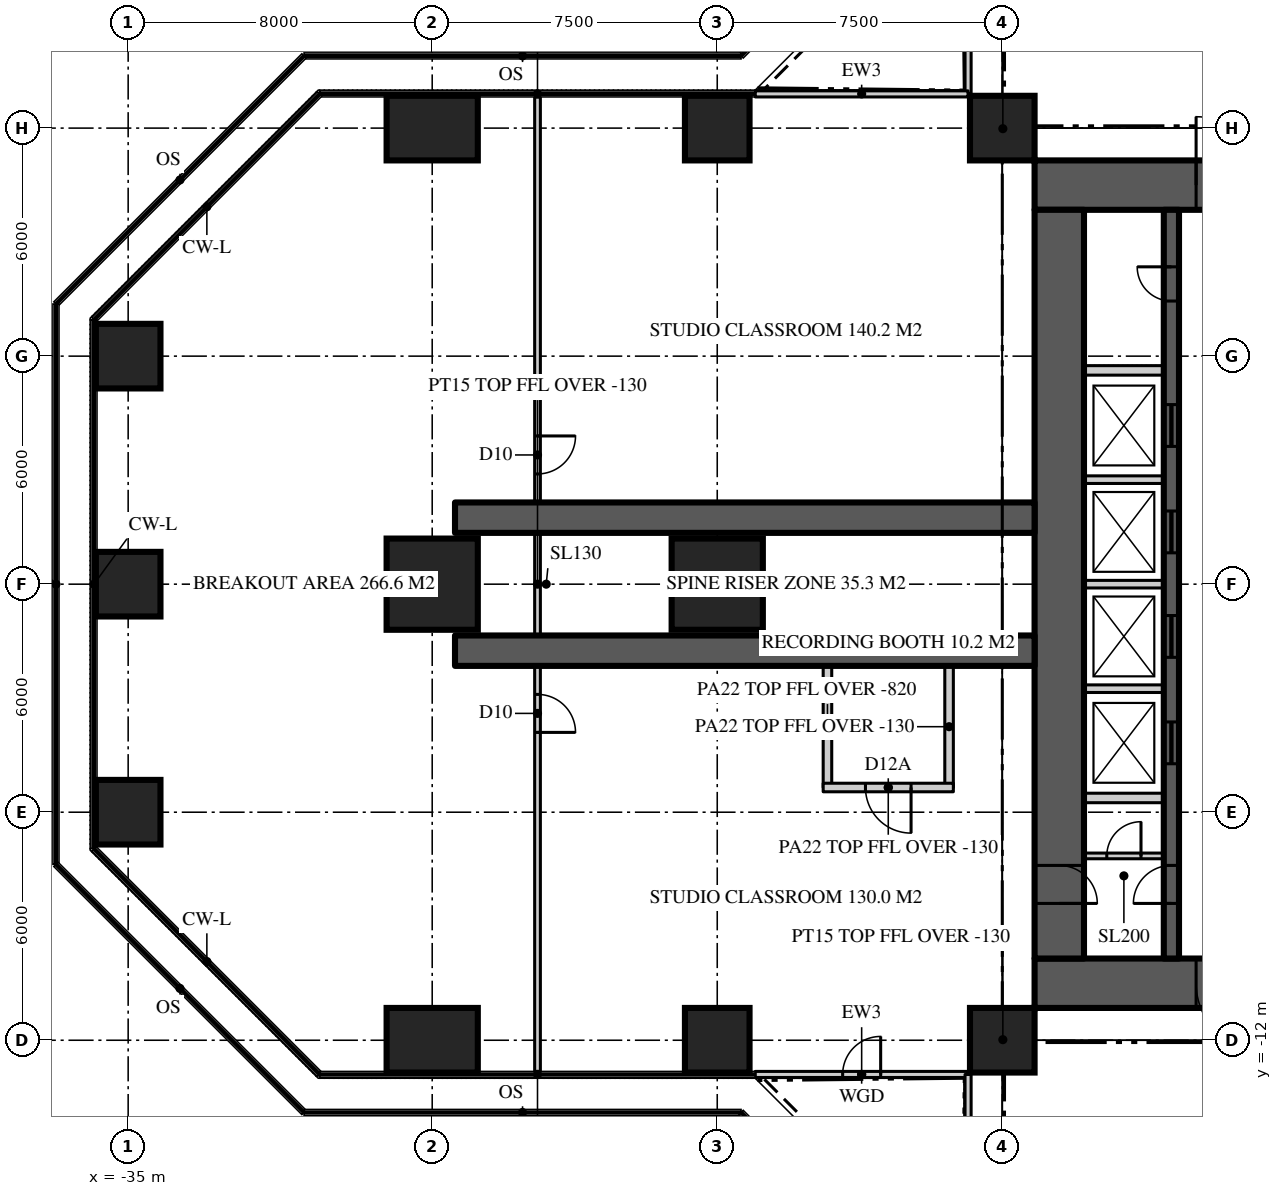
"""IFC4 building model, lengths in metres.
Left out: names, types, materials, properties, quantities, classifications, styles, units other than length and angle.
Written with IfcOpenShell. Run it as: python <this file> out.ifc"""

import sys

from ifc_helpers import new_model, si_unit, direction, frame, frame_2d, origin, origin_2d, place, context, subcontext, project, spatial, rectangle, extrude, element, fill, save


model = new_model("IFC4")
c1 = context("Model", 3, precision=1e-05, world=origin(), true_north=direction((0.0, 1.0)))
c2 = subcontext(c1, "Body", "Model", "MODEL_VIEW")
j1 = project(units=[si_unit("LENGTHUNIT", "METRE"), si_unit("PLANEANGLEUNIT", "RADIAN")], contexts=[c1])
p1 = place(None, origin())
s1 = spatial("IfcSite", under=j1, at=p1, CompositionType="ELEMENT")
p2 = place(p1, origin())
s2 = spatial("IfcBuilding", under=s1, at=p2, CompositionType="ELEMENT")
p3 = place(p2, frame((0.0, 0.0, 109.8)))
s3 = spatial("IfcBuildingStorey", under=s2, at=p3, CompositionType="ELEMENT", Elevation=109.8)
p4 = place(p3, frame((-11.15, 10.5, 0.0), z_axis=(0.0, 0.0, 1.0), x_axis=(1.0, 0.0, 0.0)))
e1 = element("IfcWall", 1, at=p4, inside=s3, PredefinedType="SHEAR", context=c2, shape_type="SweptSolid", body=[
    extrude(rectangle(XDim=22.3, YDim=1.3, at=frame_2d((11.15, 0.0))), origin(), (0.0, 0.0, 1.0), 3.9),
])
p5 = place(p4, frame((4.25, 0.0, 0.0)))
e2 = element("IfcOpeningElement", 2, at=p5, cuts=e1, PredefinedType="OPENING", context=c2, shape_type="SweptSolid", body=[
    extrude(rectangle(XDim=1.8, YDim=2.2, at=frame_2d((0.9, 1.1))), frame((0.0, 0.66, 0.0), z_axis=(0.0, -1.0, 0.0), x_axis=(1.0, 0.0, 0.0)), (0.0, 0.0, 1.0), 1.32),
])
p6 = place(p4, frame((16.25, 0.0, 0.0)))
e3 = element("IfcOpeningElement", 3, at=p6, cuts=e1, PredefinedType="OPENING", context=c2, shape_type="SweptSolid", body=[
    extrude(rectangle(XDim=1.8, YDim=2.2, at=frame_2d((0.9, 1.1))), frame((0.0, 0.66, 0.0), z_axis=(0.0, -1.0, 0.0), x_axis=(1.0, 0.0, 0.0)), (0.0, 0.0, 1.0), 1.32),
])
p7 = place(p3, frame((11.15, -10.5, 0.0), z_axis=(0.0, 0.0, 1.0), x_axis=(-1.0, 0.0, 0.0)))
e4 = element("IfcWall", 4, at=p7, inside=s3, PredefinedType="SHEAR", context=c2, shape_type="SweptSolid", body=[
    extrude(rectangle(XDim=22.3, YDim=1.3, at=frame_2d((11.15, 0.0))), origin(), (0.0, 0.0, 1.0), 3.9),
])
p8 = place(p7, frame((16.25, 0.0, 0.0)))
e5 = element("IfcOpeningElement", 5, at=p8, cuts=e4, PredefinedType="OPENING", context=c2, shape_type="SweptSolid", body=[
    extrude(rectangle(XDim=1.8, YDim=2.2, at=frame_2d((0.9, 1.1))), frame((0.0, 0.66, 0.0), z_axis=(0.0, -1.0, 0.0), x_axis=(1.0, 0.0, 0.0)), (0.0, 0.0, 1.0), 1.32),
])
p9 = place(p7, frame((4.25, 0.0, 0.0)))
e6 = element("IfcOpeningElement", 6, at=p9, cuts=e4, PredefinedType="OPENING", context=c2, shape_type="SweptSolid", body=[
    extrude(rectangle(XDim=1.8, YDim=2.2, at=frame_2d((0.9, 1.1))), frame((0.0, 0.66, 0.0), z_axis=(0.0, -1.0, 0.0), x_axis=(1.0, 0.0, 0.0)), (0.0, 0.0, 1.0), 1.32),
])
p10 = place(p3, frame((-10.5, 9.85, 0.0), z_axis=(0.0, 0.0, 1.0), x_axis=(0.0, -1.0, 0.0)))
e7 = element("IfcWall", 7, at=p10, inside=s3, PredefinedType="SHEAR", context=c2, shape_type="SweptSolid", body=[
    extrude(rectangle(XDim=19.7, YDim=1.3, at=frame_2d((9.85, 0.0))), origin(), (0.0, 0.0, 1.0), 3.9),
])
p11 = place(p10, frame((17.25, 0.0, 0.0)))
e8 = element("IfcOpeningElement", 8, at=p11, cuts=e7, PredefinedType="OPENING", context=c2, shape_type="SweptSolid", body=[
    extrude(rectangle(XDim=1.0, YDim=2.2, at=frame_2d((0.5, 1.1))), frame((0.0, 0.66, 0.0), z_axis=(0.0, -1.0, 0.0), x_axis=(1.0, 0.0, 0.0)), (0.0, 0.0, 1.0), 1.32),
])
for number, where, z_axis, x_axis in (
    (9, (-11.15, 1.75, 0.0), (0.0, 0.0, 1.0), (-1.0, 0.0, 0.0)),
    (10, (-11.15, -1.75, 0.0), (0.0, 0.0, 1.0), (-1.0, 0.0, 0.0)),
):
    element("IfcWall", number, at=place(p3, frame(where, z_axis=z_axis, x_axis=x_axis)), inside=s3, PredefinedType="SHEAR", context=c2, shape_type="SweptSolid", body=[
        extrude(rectangle(XDim=15.25, YDim=0.8, at=frame_2d((7.625, 0.0))), origin(), (0.0, 0.0, 1.0), 3.9),
    ])
p12 = place(p3, frame((-27.0, -12.0, 0.0), z_axis=(0.0, 0.0, 1.0), x_axis=(0.0, 1.0, 0.0)))
e11 = element("IfcColumn", 11, at=p12, inside=s3, PredefinedType="COLUMN", context=c2, shape_type="SweptSolid", body=[
    extrude(rectangle(XDim=1.7, YDim=2.4, at=origin_2d()), origin(), (0.0, 0.0, 1.0), 3.9),
])
for number, where, z_axis, x_axis in (
    (12, (-19.5, -12.0, 0.0), (0.0, 0.0, 1.0), (1.0, 0.0, 0.0)),
    (13, (-12.0, -12.0, 0.0), (0.0, 0.0, 1.0), (1.0, 0.0, 0.0)),
    (14, (-35.0, -6.0, 0.0), (0.0, 0.0, 1.0), (1.0, 0.0, 0.0)),
    (15, (-35.0, 0.0, 0.0), (0.0, 0.0, 1.0), (1.0, 0.0, 0.0)),
):
    element("IfcColumn", number, at=place(p3, frame(where, z_axis=z_axis, x_axis=x_axis)), inside=s3, PredefinedType="COLUMN", context=c2, shape_type="SweptSolid", body=[
        extrude(rectangle(XDim=1.7, YDim=1.7, at=origin_2d()), origin(), (0.0, 0.0, 1.0), 3.9),
    ])
for number, where, z_axis, x_axis in (
    (16, (-27.0, 0.0, 0.0), (0.0, 0.0, 1.0), (1.0, 0.0, 0.0)),
    (17, (-19.5, 0.0, 0.0), (0.0, 0.0, 1.0), (1.0, 0.0, 0.0)),
):
    element("IfcColumn", number, at=place(p3, frame(where, z_axis=z_axis, x_axis=x_axis)), inside=s3, PredefinedType="COLUMN", context=c2, shape_type="SweptSolid", body=[
        extrude(rectangle(XDim=2.4, YDim=2.4, at=origin_2d()), origin(), (0.0, 0.0, 1.0), 3.9),
    ])
p13 = place(p3, frame((-35.0, 6.0, 0.0), z_axis=(0.0, 0.0, 1.0), x_axis=(1.0, 0.0, 0.0)))
e18 = element("IfcColumn", 18, at=p13, inside=s3, PredefinedType="COLUMN", context=c2, shape_type="SweptSolid", body=[
    extrude(rectangle(XDim=1.7, YDim=1.7, at=origin_2d()), origin(), (0.0, 0.0, 1.0), 3.9),
])
p14 = place(p3, frame((-27.0, 12.0, 0.0), z_axis=(0.0, 0.0, 1.0), x_axis=(0.0, 1.0, 0.0)))
e19 = element("IfcColumn", 19, at=p14, inside=s3, PredefinedType="COLUMN", context=c2, shape_type="SweptSolid", body=[
    extrude(rectangle(XDim=1.7, YDim=2.4, at=origin_2d()), origin(), (0.0, 0.0, 1.0), 3.9),
])
for number, where, z_axis, x_axis in (
    (20, (-19.5, 12.0, 0.0), (0.0, 0.0, 1.0), (1.0, 0.0, 0.0)),
    (21, (-12.0, 12.0, 0.0), (0.0, 0.0, 1.0), (1.0, 0.0, 0.0)),
):
    element("IfcColumn", number, at=place(p3, frame(where, z_axis=z_axis, x_axis=x_axis)), inside=s3, PredefinedType="COLUMN", context=c2, shape_type="SweptSolid", body=[
        extrude(rectangle(XDim=1.7, YDim=1.7, at=origin_2d()), origin(), (0.0, 0.0, 1.0), 3.9),
    ])
p15 = place(p3, frame((-12.9, 18.5, 0.0), z_axis=(0.0, 0.0, 1.0), x_axis=(0.0, -1.0, 0.0)))
e22 = element("IfcWall", 22, at=p15, inside=s3, PredefinedType="SOLIDWALL", context=c2, shape_type="SweptSolid", body=[
    extrude(rectangle(XDim=5.6, YDim=0.16, at=frame_2d((2.8, 0.0))), origin(), (0.0, 0.0, 1.0), 3.77),
])
p16 = place(p15, frame((2.3, 0.0, 0.0)))
e23 = element("IfcOpeningElement", 23, at=p16, cuts=e22, PredefinedType="OPENING", context=c2, shape_type="SweptSolid", body=[
    extrude(rectangle(XDim=1.0, YDim=2.2, at=frame_2d((0.5, 1.1))), frame((0.0, 0.09, 0.0), z_axis=(0.0, -1.0, 0.0), x_axis=(1.0, 0.0, 0.0)), (0.0, 0.0, 1.0), 0.18),
])
p17 = place(p3, frame((-12.9, 12.9, 0.0), z_axis=(0.0, 0.0, 1.0), x_axis=(-1.0, 0.0, 0.0)))
e24 = element("IfcWall", 24, at=p17, inside=s3, PredefinedType="SOLIDWALL", context=c2, shape_type="SweptSolid", body=[
    extrude(rectangle(XDim=5.6, YDim=0.16, at=frame_2d((2.8, 0.0))), origin(), (0.0, 0.0, 1.0), 3.77),
])
p18 = place(p3, frame((-18.5, -12.9, 0.0), z_axis=(0.0, 0.0, 1.0), x_axis=(1.0, 0.0, 0.0)))
e25 = element("IfcWall", 25, at=p18, inside=s3, PredefinedType="SOLIDWALL", context=c2, shape_type="SweptSolid", body=[
    extrude(rectangle(XDim=5.6, YDim=0.16, at=frame_2d((2.8, 0.0))), origin(), (0.0, 0.0, 1.0), 3.77),
])
p19 = place(p18, frame((2.3, 0.0, 0.0)))
e26 = element("IfcOpeningElement", 26, at=p19, cuts=e25, PredefinedType="OPENING", context=c2, shape_type="SweptSolid", body=[
    extrude(rectangle(XDim=1.0, YDim=2.2, at=frame_2d((0.5, 1.1))), frame((0.0, 0.09, 0.0), z_axis=(0.0, -1.0, 0.0), x_axis=(1.0, 0.0, 0.0)), (0.0, 0.0, 1.0), 0.18),
])
p20 = place(p3, frame((-12.9, -12.9, 0.0), z_axis=(0.0, 0.0, 1.0), x_axis=(0.0, -1.0, 0.0)))
e27 = element("IfcWall", 27, at=p20, inside=s3, PredefinedType="SOLIDWALL", context=c2, shape_type="SweptSolid", body=[
    extrude(rectangle(XDim=5.6, YDim=0.16, at=frame_2d((2.8, 0.0))), origin(), (0.0, 0.0, 1.0), 3.77),
])
p21 = place(p3, frame((-7.55, -9.85, 0.0), z_axis=(0.0, 0.0, 1.0), x_axis=(0.0, 1.0, 0.0)))
e28 = element("IfcWall", 28, at=p21, inside=s3, PredefinedType="SHEAR", context=c2, shape_type="SweptSolid", body=[
    extrude(rectangle(XDim=19.7, YDim=0.4, at=frame_2d((9.85, 0.0))), origin(), (0.0, 0.0, 1.0), 3.9),
])
p22 = place(p21, frame((1.45, 0.0, 0.0)))
e29 = element("IfcOpeningElement", 29, at=p22, cuts=e28, PredefinedType="OPENING", context=c2, shape_type="SweptSolid", body=[
    extrude(rectangle(XDim=1.0, YDim=2.2, at=frame_2d((0.5, 1.1))), frame((0.0, 0.21, 0.0), z_axis=(0.0, -1.0, 0.0), x_axis=(1.0, 0.0, 0.0)), (0.0, 0.0, 1.0), 0.42),
])
p23 = place(p21, frame((17.3, 0.0, 0.0)))
e30 = element("IfcOpeningElement", 30, at=p23, cuts=e28, PredefinedType="OPENING", context=c2, shape_type="SweptSolid", body=[
    extrude(rectangle(XDim=0.9, YDim=2.1, at=frame_2d((0.45, 1.05))), frame((0.0, 0.21, 0.0), z_axis=(0.0, -1.0, 0.0), x_axis=(1.0, 0.0, 0.0)), (0.0, 0.0, 1.0), 0.42),
])
p24 = place(p21, frame((5.125, 0.0, 0.0)))
e31 = element("IfcOpeningElement", 31, at=p24, cuts=e28, PredefinedType="OPENING", context=c2, shape_type="SweptSolid", body=[
    extrude(rectangle(XDim=1.1, YDim=2.2, at=frame_2d((0.55, 1.1))), frame((0.0, 0.21, 0.0), z_axis=(0.0, -1.0, 0.0), x_axis=(1.0, 0.0, 0.0)), (0.0, 0.0, 1.0), 0.42),
])
p25 = place(p21, frame((7.925, 0.0, 0.0)))
e32 = element("IfcOpeningElement", 32, at=p25, cuts=e28, PredefinedType="OPENING", context=c2, shape_type="SweptSolid", body=[
    extrude(rectangle(XDim=1.1, YDim=2.2, at=frame_2d((0.55, 1.1))), frame((0.0, 0.21, 0.0), z_axis=(0.0, -1.0, 0.0), x_axis=(1.0, 0.0, 0.0)), (0.0, 0.0, 1.0), 0.42),
])
p26 = place(p21, frame((10.675, 0.0, 0.0)))
e33 = element("IfcOpeningElement", 33, at=p26, cuts=e28, PredefinedType="OPENING", context=c2, shape_type="SweptSolid", body=[
    extrude(rectangle(XDim=1.1, YDim=2.2, at=frame_2d((0.55, 1.1))), frame((0.0, 0.21, 0.0), z_axis=(0.0, -1.0, 0.0), x_axis=(1.0, 0.0, 0.0)), (0.0, 0.0, 1.0), 0.42),
])
p27 = place(p21, frame((13.475, 0.0, 0.0)))
e34 = element("IfcOpeningElement", 34, at=p27, cuts=e28, PredefinedType="OPENING", context=c2, shape_type="SweptSolid", body=[
    extrude(rectangle(XDim=1.1, YDim=2.2, at=frame_2d((0.55, 1.1))), frame((0.0, 0.21, 0.0), z_axis=(0.0, -1.0, 0.0), x_axis=(1.0, 0.0, 0.0)), (0.0, 0.0, 1.0), 0.42),
])
for number, where, z_axis, x_axis in (
    (35, (-9.85, 5.625, 0.0), (0.0, 0.0, 1.0), (1.0, 0.0, 0.0)),
    (36, (-9.85, -5.625, 0.0), (0.0, 0.0, 1.0), (1.0, 0.0, 0.0)),
):
    element("IfcWall", number, at=place(p3, frame(where, z_axis=z_axis, x_axis=x_axis)), inside=s3, PredefinedType="SOLIDWALL", context=c2, shape_type="SweptSolid", body=[
        extrude(rectangle(XDim=2.1, YDim=0.25, at=frame_2d((1.05, 0.0))), origin(), (0.0, 0.0, 1.0), 3.7),
    ])
for number, where, z_axis, x_axis in (
    (37, (-9.85, -2.75, 0.0), (0.0, 0.0, 1.0), (1.0, 0.0, 0.0)),
    (38, (-9.85, 0.0, 0.0), (0.0, 0.0, 1.0), (1.0, 0.0, 0.0)),
    (39, (-9.85, 2.75, 0.0), (0.0, 0.0, 1.0), (1.0, 0.0, 0.0)),
):
    element("IfcWall", number, at=place(p3, frame(where, z_axis=z_axis, x_axis=x_axis)), inside=s3, PredefinedType="SOLIDWALL", context=c2, shape_type="SweptSolid", body=[
        extrude(rectangle(XDim=2.1, YDim=0.2, at=frame_2d((1.05, 0.0))), origin(), (0.0, 0.0, 1.0), 3.7),
    ])
p28 = place(p3, frame((-24.229, 12.82, 0.0), z_axis=(0.0, 0.0, 1.0), x_axis=(0.0, -1.0, 0.0)))
e40 = element("IfcWall", 40, at=p28, inside=s3, PredefinedType="PARTITIONING", context=c2, shape_type="SweptSolid", body=[
    extrude(rectangle(XDim=25.64, YDim=0.15, at=frame_2d((12.82, 0.0))), origin(), (0.0, 0.0, 1.0), 3.77),
])
p29 = place(p28, frame((15.72, 0.0, 0.0)))
e41 = element("IfcOpeningElement", 41, at=p29, cuts=e40, PredefinedType="OPENING", context=c2, shape_type="SweptSolid", body=[
    extrude(rectangle(XDim=1.0, YDim=2.2, at=frame_2d((0.5, 1.1))), frame((0.0, 0.085, 0.0), z_axis=(0.0, -1.0, 0.0), x_axis=(1.0, 0.0, 0.0)), (0.0, 0.0, 1.0), 0.17),
])
p30 = place(p28, frame((8.92, 0.0, 0.0)))
e42 = element("IfcOpeningElement", 42, at=p30, cuts=e40, PredefinedType="OPENING", context=c2, shape_type="SweptSolid", body=[
    extrude(rectangle(XDim=1.0, YDim=2.2, at=frame_2d((0.5, 1.1))), frame((0.0, 0.085, 0.0), z_axis=(0.0, -1.0, 0.0), x_axis=(1.0, 0.0, 0.0)), (0.0, 0.0, 1.0), 0.17),
])
p31 = place(p3, frame((-13.4, -2.15, 0.0), z_axis=(0.0, 0.0, 1.0), x_axis=(0.0, -1.0, 0.0)))
e43 = element("IfcWall", 43, at=p31, inside=s3, PredefinedType="PARTITIONING", context=c2, shape_type="SweptSolid", body=[
    extrude(rectangle(XDim=3.2, YDim=0.225, at=frame_2d((1.6, 0.0))), origin(), (0.0, 0.0, 1.0), 3.77),
])
p32 = place(p3, frame((-16.6, -2.15, 0.0), z_axis=(0.0, 0.0, 1.0), x_axis=(0.0, -1.0, 0.0)))
e44 = element("IfcWall", 44, at=p32, inside=s3, PredefinedType="PARTITIONING", context=c2, shape_type="SweptSolid", body=[
    extrude(rectangle(XDim=3.2, YDim=0.225, at=frame_2d((1.6, 0.0))), origin(), (0.0, 0.0, 1.0), 3.08),
])
p33 = place(p3, frame((-13.288, -5.35, 0.0), z_axis=(0.0, 0.0, 1.0), x_axis=(-1.0, 0.0, 0.0)))
e45 = element("IfcWall", 45, at=p33, inside=s3, PredefinedType="PARTITIONING", context=c2, shape_type="SweptSolid", body=[
    extrude(rectangle(XDim=3.425, YDim=0.225, at=frame_2d((1.712, 0.0))), origin(), (0.0, 0.0, 1.0), 3.77),
])
p34 = place(p33, frame((1.113, 0.0, 0.0)))
e46 = element("IfcOpeningElement", 46, at=p34, cuts=e45, PredefinedType="OPENING", context=c2, shape_type="SweptSolid", body=[
    extrude(rectangle(XDim=1.2, YDim=2.2, at=frame_2d((0.6, 1.1))), frame((0.0, 0.123, 0.0), z_axis=(0.0, -1.0, 0.0), x_axis=(1.0, 0.0, 0.0)), (0.0, 0.0, 1.0), 0.245),
])
for number, where, z_axis, x_axis in (
    (47, (-11.15, 11.15, 0.0), (0.0, 0.0, 1.0), (-0.707, 0.707, 0.0)),
    (48, (-11.15, -11.15, 0.0), (0.0, 0.0, 1.0), (-0.707, -0.707, 0.0)),
):
    element("IfcWall", number, at=place(p3, frame(where, z_axis=z_axis, x_axis=x_axis)), inside=s3, PredefinedType="PARTITIONING", context=c2, shape_type="SweptSolid", body=[
        extrude(rectangle(XDim=2.362, YDim=0.15, at=frame_2d((1.181, 0.0))), origin(), (0.0, 0.0, 1.0), 3.77),
    ])
p35 = place(p3, frame((-9.85, -7.15, 0.0), z_axis=(0.0, 0.0, 1.0), x_axis=(1.0, 0.0, 0.0)))
e49 = element("IfcWall", 49, at=p35, inside=s3, PredefinedType="SOLIDWALL", context=c2, shape_type="SweptSolid", body=[
    extrude(rectangle(XDim=2.1, YDim=0.15, at=frame_2d((1.05, 0.0))), origin(), (0.0, 0.0, 1.0), 3.77),
])
p36 = place(p35, frame((0.6, 0.0, 0.0)))
e50 = element("IfcOpeningElement", 50, at=p36, cuts=e49, PredefinedType="OPENING", context=c2, shape_type="SweptSolid", body=[
    extrude(rectangle(XDim=0.9, YDim=2.1, at=frame_2d((0.45, 1.05))), frame((0.0, 0.085, 0.0), z_axis=(0.0, -1.0, 0.0), x_axis=(1.0, 0.0, 0.0)), (0.0, 0.0, 1.0), 0.17),
])
p37 = place(p19, origin())
e51 = element("IfcDoor", 51, at=p37, inside=s3, OperationType="SINGLE_SWING_RIGHT", PredefinedType="DOOR", context=c2, shape_type="SweptSolid", body=[
    extrude(rectangle(XDim=1.0, YDim=2.2, at=frame_2d((0.5, 1.1))), frame((0.0, 0.025, 0.0), z_axis=(0.0, -1.0, 0.0), x_axis=(1.0, 0.0, 0.0)), (0.0, 0.0, 1.0), 0.05),
])
fill(e26, e51)
p38 = place(p5, origin())
e52 = element("IfcDoor", 52, at=p38, inside=s3, OperationType="DOUBLE_DOOR_DOUBLE_SWING", PredefinedType="DOOR", context=c2, shape_type="SweptSolid", body=[
    extrude(rectangle(XDim=1.8, YDim=2.2, at=frame_2d((0.9, 1.1))), frame((0.0, 0.025, 0.0), z_axis=(0.0, -1.0, 0.0), x_axis=(1.0, 0.0, 0.0)), (0.0, 0.0, 1.0), 0.05),
])
fill(e2, e52)
p39 = place(p8, origin())
e53 = element("IfcDoor", 53, at=p39, inside=s3, OperationType="DOUBLE_DOOR_DOUBLE_SWING", PredefinedType="DOOR", context=c2, shape_type="SweptSolid", body=[
    extrude(rectangle(XDim=1.8, YDim=2.2, at=frame_2d((0.9, 1.1))), frame((0.0, 0.025, 0.0), z_axis=(0.0, -1.0, 0.0), x_axis=(1.0, 0.0, 0.0)), (0.0, 0.0, 1.0), 0.05),
])
fill(e5, e53)
p40 = place(p22, origin())
e54 = element("IfcDoor", 54, at=p40, inside=s3, OperationType="SINGLE_SWING_LEFT", PredefinedType="DOOR", context=c2, shape_type="SweptSolid", body=[
    extrude(rectangle(XDim=1.0, YDim=2.2, at=frame_2d((0.5, 1.1))), frame((0.0, 0.025, 0.0), z_axis=(0.0, -1.0, 0.0), x_axis=(1.0, 0.0, 0.0)), (0.0, 0.0, 1.0), 0.05),
])
fill(e29, e54)
p41 = place(p11, origin())
e55 = element("IfcDoor", 55, at=p41, inside=s3, OperationType="SINGLE_SWING_RIGHT", PredefinedType="DOOR", context=c2, shape_type="SweptSolid", body=[
    extrude(rectangle(XDim=1.0, YDim=2.2, at=frame_2d((0.5, 1.1))), frame((0.0, 0.025, 0.0), z_axis=(0.0, -1.0, 0.0), x_axis=(1.0, 0.0, 0.0)), (0.0, 0.0, 1.0), 0.05),
])
fill(e8, e55)
p42 = place(p23, origin())
e56 = element("IfcDoor", 56, at=p42, inside=s3, OperationType="SINGLE_SWING_RIGHT", PredefinedType="DOOR", context=c2, shape_type="SweptSolid", body=[
    extrude(rectangle(XDim=0.9, YDim=2.1, at=frame_2d((0.45, 1.05))), frame((0.0, 0.025, 0.0), z_axis=(0.0, -1.0, 0.0), x_axis=(1.0, 0.0, 0.0)), (0.0, 0.0, 1.0), 0.05),
])
fill(e30, e56)
p43 = place(p24, origin())
e57 = element("IfcDoor", 57, at=p43, inside=s3, OperationType="SLIDING_TO_LEFT", PredefinedType="DOOR", context=c2, shape_type="SweptSolid", body=[
    extrude(rectangle(XDim=1.1, YDim=2.2, at=frame_2d((0.55, 1.1))), frame((0.0, 0.025, 0.0), z_axis=(0.0, -1.0, 0.0), x_axis=(1.0, 0.0, 0.0)), (0.0, 0.0, 1.0), 0.05),
])
fill(e31, e57)
p44 = place(p25, origin())
e58 = element("IfcDoor", 58, at=p44, inside=s3, OperationType="SLIDING_TO_LEFT", PredefinedType="DOOR", context=c2, shape_type="SweptSolid", body=[
    extrude(rectangle(XDim=1.1, YDim=2.2, at=frame_2d((0.55, 1.1))), frame((0.0, 0.025, 0.0), z_axis=(0.0, -1.0, 0.0), x_axis=(1.0, 0.0, 0.0)), (0.0, 0.0, 1.0), 0.05),
])
fill(e32, e58)
p45 = place(p26, origin())
e59 = element("IfcDoor", 59, at=p45, inside=s3, OperationType="SLIDING_TO_LEFT", PredefinedType="DOOR", context=c2, shape_type="SweptSolid", body=[
    extrude(rectangle(XDim=1.1, YDim=2.2, at=frame_2d((0.55, 1.1))), frame((0.0, 0.025, 0.0), z_axis=(0.0, -1.0, 0.0), x_axis=(1.0, 0.0, 0.0)), (0.0, 0.0, 1.0), 0.05),
])
fill(e33, e59)
p46 = place(p27, origin())
e60 = element("IfcDoor", 60, at=p46, inside=s3, OperationType="SLIDING_TO_LEFT", PredefinedType="DOOR", context=c2, shape_type="SweptSolid", body=[
    extrude(rectangle(XDim=1.1, YDim=2.2, at=frame_2d((0.55, 1.1))), frame((0.0, 0.025, 0.0), z_axis=(0.0, -1.0, 0.0), x_axis=(1.0, 0.0, 0.0)), (0.0, 0.0, 1.0), 0.05),
])
fill(e34, e60)
p47 = place(p29, origin())
e61 = element("IfcDoor", 61, at=p47, inside=s3, OperationType="SINGLE_SWING_RIGHT", PredefinedType="DOOR", context=c2, shape_type="SweptSolid", body=[
    extrude(rectangle(XDim=1.0, YDim=2.2, at=frame_2d((0.5, 1.1))), frame((0.0, 0.025, 0.0), z_axis=(0.0, -1.0, 0.0), x_axis=(1.0, 0.0, 0.0)), (0.0, 0.0, 1.0), 0.05),
])
fill(e41, e61)
p48 = place(p30, origin())
e62 = element("IfcDoor", 62, at=p48, inside=s3, OperationType="SINGLE_SWING_LEFT", PredefinedType="DOOR", context=c2, shape_type="SweptSolid", body=[
    extrude(rectangle(XDim=1.0, YDim=2.2, at=frame_2d((0.5, 1.1))), frame((0.0, 0.025, 0.0), z_axis=(0.0, -1.0, 0.0), x_axis=(1.0, 0.0, 0.0)), (0.0, 0.0, 1.0), 0.05),
])
fill(e42, e62)
p49 = place(p34, origin())
e63 = element("IfcDoor", 63, at=p49, inside=s3, OperationType="SINGLE_SWING_LEFT", PredefinedType="DOOR", context=c2, shape_type="SweptSolid", body=[
    extrude(rectangle(XDim=1.2, YDim=2.2, at=frame_2d((0.6, 1.1))), frame((0.0, 0.025, 0.0), z_axis=(0.0, -1.0, 0.0), x_axis=(1.0, 0.0, 0.0)), (0.0, 0.0, 1.0), 0.05),
])
fill(e46, e63)
p50 = place(p36, origin())
e64 = element("IfcDoor", 64, at=p50, inside=s3, OperationType="SINGLE_SWING_RIGHT", PredefinedType="DOOR", context=c2, shape_type="SweptSolid", body=[
    extrude(rectangle(XDim=0.9, YDim=2.1, at=frame_2d((0.45, 1.05))), frame((0.0, 0.025, 0.0), z_axis=(0.0, -1.0, 0.0), x_axis=(1.0, 0.0, 0.0)), (0.0, 0.0, 1.0), 0.05),
])
fill(e50, e64)
save(model, sys.argv[1])
